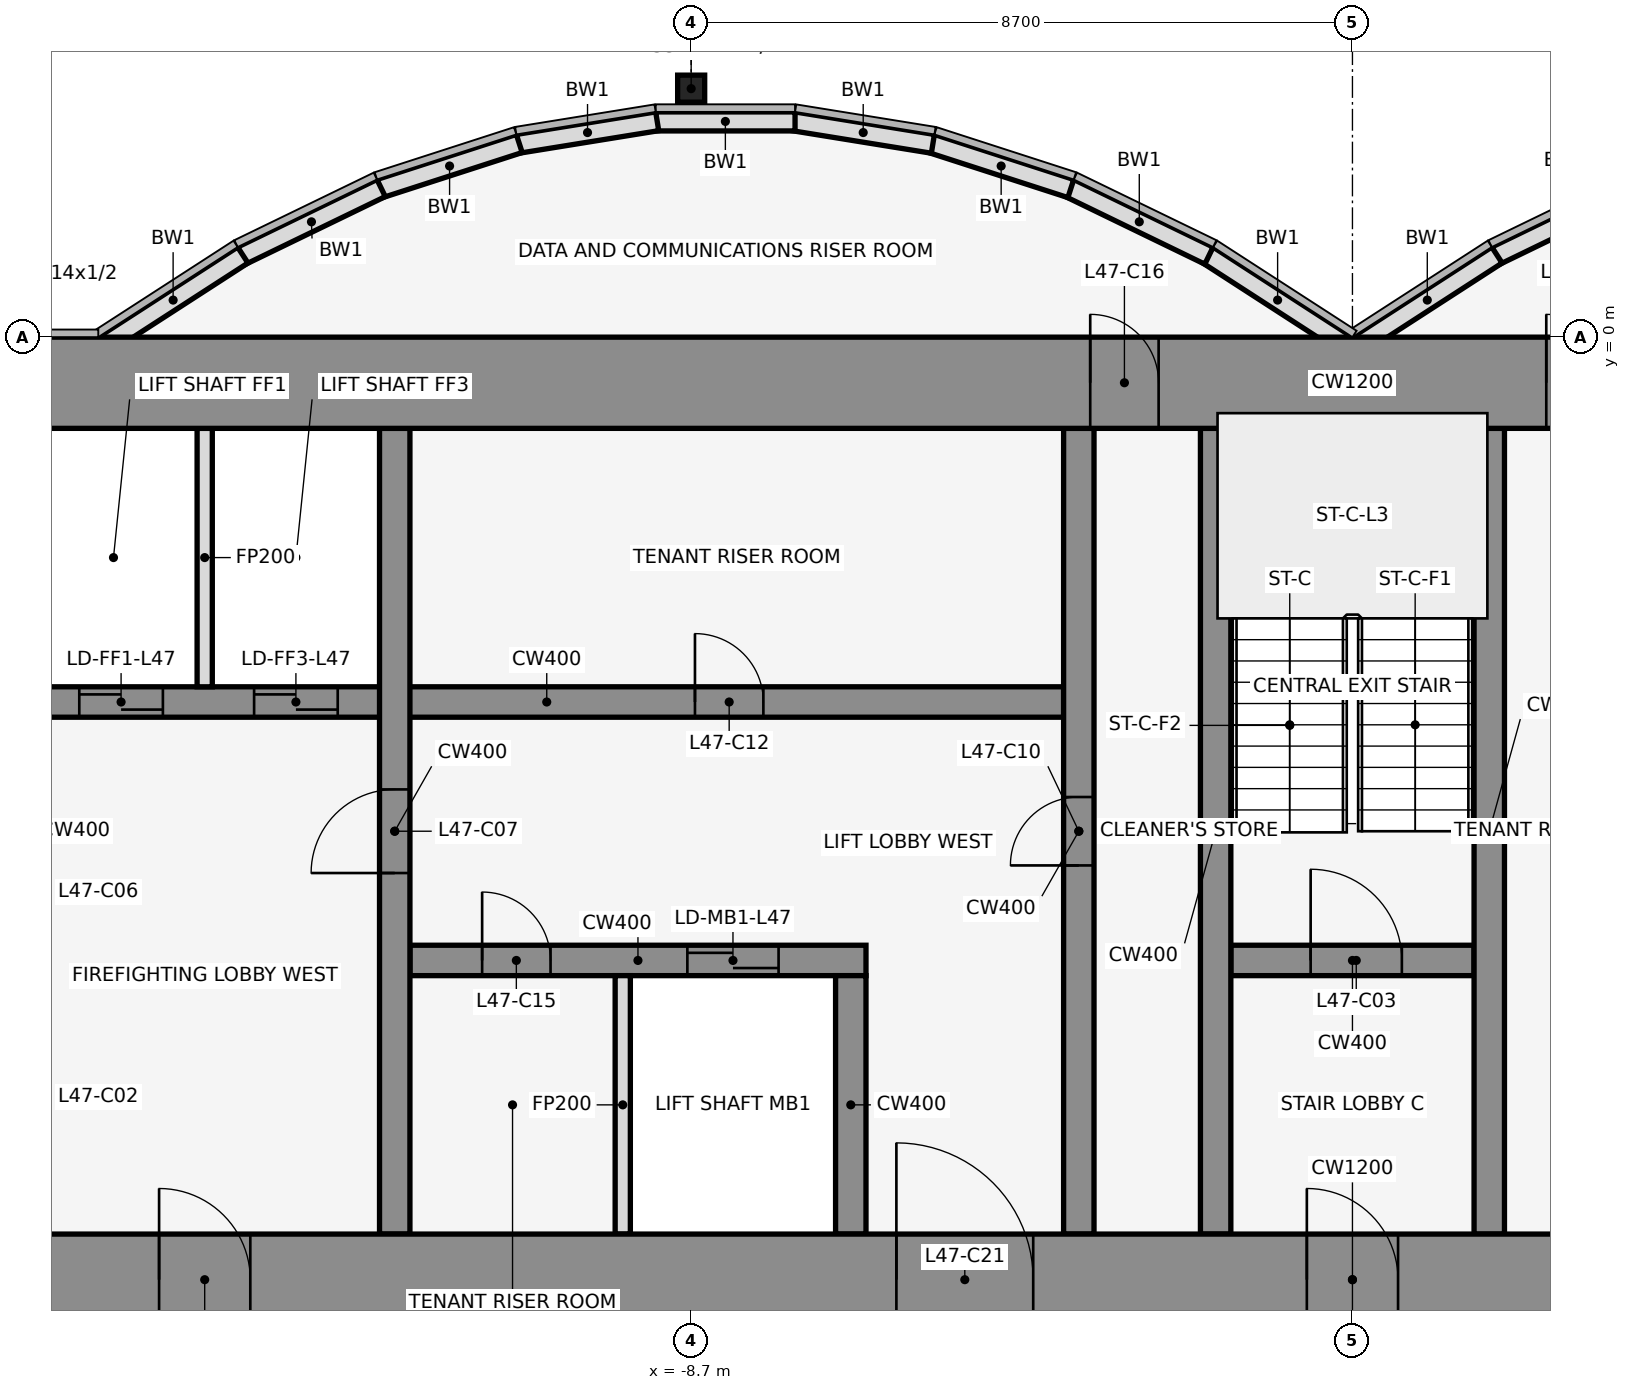
"""IFC4 building model, lengths in metres.
Left out: names, types, materials, properties, quantities, classifications, styles, units other than length and angle.
Written with IfcOpenShell. Run it as: python <this file> out.ifc"""

import sys

from ifc_helpers import new_model, si_unit, direction, frame, frame_2d, origin, origin_2d, place, context, subcontext, project, spatial, rectangle, hollow_rectangle, extrude, element, fill, save


model = new_model("IFC4")
c1 = context("Model", 3, precision=1e-05, world=origin(), true_north=direction((0.0, 1.0)))
c2 = subcontext(c1, "Body", "Model", "MODEL_VIEW")
j1 = project(units=[si_unit("LENGTHUNIT", "METRE"), si_unit("PLANEANGLEUNIT", "RADIAN")], contexts=[c1])
p1 = place(None, origin())
s1 = spatial("IfcSite", under=j1, at=p1, CompositionType="ELEMENT")
p2 = place(p1, origin())
s2 = spatial("IfcBuilding", under=s1, at=p2, CompositionType="ELEMENT")
p3 = place(p2, frame((0.0, 0.0, 211.4)))
s3 = spatial("IfcBuildingStorey", under=s2, at=p3, CompositionType="ELEMENT", Elevation=211.4)
p4 = place(p3, frame((-8.7, 3.269, 0.0), z_axis=(0.0, 0.0, 1.0), x_axis=(1.0, 0.0, 0.0)))
e1 = element("IfcColumn", 1, at=p4, inside=s3, PredefinedType="COLUMN", context=c2, shape_type="SweptSolid", body=[
    extrude(hollow_rectangle(XDim=0.356, YDim=0.356, WallThickness=0.012, at=origin_2d()), origin(), (0.0, 0.0, 1.0), 4.1),
])
p5 = place(p3, frame((3.721, 1.962, 0.0), z_axis=(0.0, 0.0, 1.0), x_axis=(-0.89982408427, -0.436252928206, 0.0)))
e2 = element("IfcWall", 2, at=p5, inside=s3, PredefinedType="STANDARD", context=c2, shape_type="SweptSolid", body=[
    extrude(rectangle(XDim=2.038, YDim=0.25, at=frame_2d((1.019, 0.0))), origin(), (0.0, 0.0, 1.0), 3.95),
])
for number, where, z_axis, x_axis in (
    (3, (1.901, 1.08, 0.0), (0.0, 0.0, 1.0), (-0.84, -0.543, 0.0)),
    (4, (-0.068, -0.105, 0.0), (0.0, 0.0, 1.0), (-0.84, 0.543, 0.0)),
):
    element("IfcWall", number, at=place(p3, frame(where, z_axis=z_axis, x_axis=x_axis)), inside=s3, PredefinedType="STANDARD", context=c2, shape_type="SweptSolid", body=[
        extrude(rectangle(XDim=2.183, YDim=0.25, at=frame_2d((1.091, 0.0))), origin(), (0.0, 0.0, 1.0), 3.95),
    ])
p6 = place(p3, frame((-1.888, 1.073, 0.0), z_axis=(0.0, 0.0, 1.0), x_axis=(-0.89982408427, 0.436252928206, 0.0)))
e5 = element("IfcWall", 5, at=p6, inside=s3, PredefinedType="STANDARD", context=c2, shape_type="SweptSolid", body=[
    extrude(rectangle(XDim=2.038, YDim=0.25, at=frame_2d((1.019, 0.0))), origin(), (0.0, 0.0, 1.0), 3.95),
])
p7 = place(p3, frame((-3.705, 1.955, 0.0), z_axis=(0.0, 0.0, 1.0), x_axis=(-0.951495806175, 0.307661714928, 0.0)))
e6 = element("IfcWall", 6, at=p7, inside=s3, PredefinedType="STANDARD", context=c2, shape_type="SweptSolid", body=[
    extrude(rectangle(XDim=1.927, YDim=0.25, at=frame_2d((0.963, 0.0))), origin(), (0.0, 0.0, 1.0), 3.95),
])
p8 = place(p3, frame((-5.52, 2.543, 0.0), z_axis=(0.0, 0.0, 1.0), x_axis=(-0.987181718931, 0.159600293885, 0.0)))
e7 = element("IfcWall", 7, at=p8, inside=s3, PredefinedType="STANDARD", context=c2, shape_type="SweptSolid", body=[
    extrude(rectangle(XDim=1.857, YDim=0.25, at=frame_2d((0.929, 0.0))), origin(), (0.0, 0.0, 1.0), 3.95),
])
p9 = place(p3, frame((-7.333, 2.838, 0.0), z_axis=(0.0, 0.0, 1.0), x_axis=(-1.0, 0.0, 0.0)))
e8 = element("IfcWall", 8, at=p9, inside=s3, PredefinedType="STANDARD", context=c2, shape_type="SweptSolid", body=[
    extrude(rectangle(XDim=1.833, YDim=0.25, at=frame_2d((0.917, 0.0))), origin(), (0.0, 0.0, 1.0), 3.95),
])
p10 = place(p3, frame((-9.147, 2.84, 0.0), z_axis=(0.0, 0.0, 1.0), x_axis=(-0.987181718931, -0.159600293885, 0.0)))
e9 = element("IfcWall", 9, at=p10, inside=s3, PredefinedType="STANDARD", context=c2, shape_type="SweptSolid", body=[
    extrude(rectangle(XDim=1.857, YDim=0.25, at=frame_2d((0.929, 0.0))), origin(), (0.0, 0.0, 1.0), 3.95),
])
p11 = place(p3, frame((-10.962, 2.548, 0.0), z_axis=(0.0, 0.0, 1.0), x_axis=(-0.951495806175, -0.307661714928, 0.0)))
e10 = element("IfcWall", 10, at=p11, inside=s3, PredefinedType="STANDARD", context=c2, shape_type="SweptSolid", body=[
    extrude(rectangle(XDim=1.927, YDim=0.25, at=frame_2d((0.963, 0.0))), origin(), (0.0, 0.0, 1.0), 3.95),
])
p12 = place(p3, frame((-12.779, 1.962, 0.0), z_axis=(0.0, 0.0, 1.0), x_axis=(-0.89982408427, -0.436252928206, 0.0)))
e11 = element("IfcWall", 11, at=p12, inside=s3, PredefinedType="STANDARD", context=c2, shape_type="SweptSolid", body=[
    extrude(rectangle(XDim=2.038, YDim=0.25, at=frame_2d((1.019, 0.0))), origin(), (0.0, 0.0, 1.0), 3.95),
])
p13 = place(p3, frame((-14.599, 1.08, 0.0), z_axis=(0.0, 0.0, 1.0), x_axis=(-0.83981312244, -0.542875602121, 0.0)))
e12 = element("IfcWall", 12, at=p13, inside=s3, PredefinedType="STANDARD", context=c2, shape_type="SweptSolid", body=[
    extrude(rectangle(XDim=2.183, YDim=0.25, at=frame_2d((1.091, 0.0))), origin(), (0.0, 0.0, 1.0), 3.95),
])
p14 = place(p3, frame((-12.4, -8.2, 0.0), z_axis=(0.0, 0.0, 1.0), x_axis=(1.0, 0.0, 0.0)))
e13 = element("IfcWall", 13, at=p14, inside=s3, PredefinedType="SHEAR", context=c2, shape_type="SweptSolid", body=[
    extrude(rectangle(XDim=6.0, YDim=0.4, at=frame_2d((3.0, 0.0))), origin(), (0.0, 0.0, 1.0), 4.1),
])
p15 = place(p14, frame((3.65, 0.0, 0.0)))
e14 = element("IfcOpeningElement", 14, at=p15, cuts=e13, PredefinedType="OPENING", context=c2, shape_type="SweptSolid", body=[
    extrude(rectangle(XDim=1.2, YDim=2.1, at=frame_2d((0.6, 1.05))), frame((0.0, 0.212, 0.0), z_axis=(0.0, -1.0, 0.0), x_axis=(1.0, 0.0, 0.0)), (0.0, 0.0, 1.0), 0.424),
])
p16 = place(p14, frame((0.95, 0.0, 0.0)))
e15 = element("IfcOpeningElement", 15, at=p16, cuts=e13, PredefinedType="OPENING", context=c2, shape_type="SweptSolid", body=[
    extrude(rectangle(XDim=0.9, YDim=2.1, at=frame_2d((0.45, 1.05))), frame((0.0, 0.212, 0.0), z_axis=(0.0, -1.0, 0.0), x_axis=(1.0, 0.0, 0.0)), (0.0, 0.0, 1.0), 0.424),
])
p17 = place(p3, frame((-1.6, -8.2, 0.0), z_axis=(0.0, 0.0, 1.0), x_axis=(1.0, 0.0, 0.0)))
e16 = element("IfcWall", 16, at=p17, inside=s3, PredefinedType="SHEAR", context=c2, shape_type="SweptSolid", body=[
    extrude(rectangle(XDim=3.2, YDim=0.4, at=frame_2d((1.6, 0.0))), origin(), (0.0, 0.0, 1.0), 4.1),
])
p18 = place(p17, frame((1.05, 0.0, 0.0)))
e17 = element("IfcOpeningElement", 17, at=p18, cuts=e16, PredefinedType="OPENING", context=c2, shape_type="SweptSolid", body=[
    extrude(rectangle(XDim=1.2, YDim=2.1, at=frame_2d((0.6, 1.05))), frame((0.0, 0.212, 0.0), z_axis=(0.0, -1.0, 0.0), x_axis=(1.0, 0.0, 0.0)), (0.0, 0.0, 1.0), 0.424),
])
p19 = place(p3, frame((-17.4, -4.8, 0.0), z_axis=(0.0, 0.0, 1.0), x_axis=(1.0, 0.0, 0.0)))
e18 = element("IfcWall", 18, at=p19, inside=s3, PredefinedType="SHEAR", context=c2, shape_type="SweptSolid", body=[
    extrude(rectangle(XDim=13.6, YDim=0.4, at=frame_2d((6.8, 0.0))), origin(), (0.0, 0.0, 1.0), 4.1),
])
p20 = place(p19, frame((0.65, 0.0, 0.0)))
e19 = element("IfcOpeningElement", 19, at=p20, cuts=e18, PredefinedType="OPENING", context=c2, shape_type="SweptSolid", body=[
    extrude(rectangle(XDim=1.1, YDim=2.1, at=frame_2d((0.55, 1.05))), frame((0.0, 0.212, 0.0), z_axis=(0.0, -1.0, 0.0), x_axis=(1.0, 0.0, 0.0)), (0.0, 0.0, 1.0), 0.424),
])
p21 = place(p19, frame((2.95, 0.0, 0.0)))
e20 = element("IfcOpeningElement", 20, at=p21, cuts=e18, PredefinedType="OPENING", context=c2, shape_type="SweptSolid", body=[
    extrude(rectangle(XDim=1.1, YDim=2.1, at=frame_2d((0.55, 1.05))), frame((0.0, 0.212, 0.0), z_axis=(0.0, -1.0, 0.0), x_axis=(1.0, 0.0, 0.0)), (0.0, 0.0, 1.0), 0.424),
])
p22 = place(p19, frame((8.75, 0.0, 0.0)))
e21 = element("IfcOpeningElement", 21, at=p22, cuts=e18, PredefinedType="OPENING", context=c2, shape_type="SweptSolid", body=[
    extrude(rectangle(XDim=0.9, YDim=2.1, at=frame_2d((0.45, 1.05))), frame((0.0, 0.212, 0.0), z_axis=(0.0, -1.0, 0.0), x_axis=(1.0, 0.0, 0.0)), (0.0, 0.0, 1.0), 0.424),
])
p23 = place(p3, frame((-15.1, -4.6, 0.0), z_axis=(0.0, 0.0, 1.0), x_axis=(0.0, 1.0, 0.0)))
e22 = element("IfcWall", 22, at=p23, inside=s3, PredefinedType="PARTITIONING", context=c2, shape_type="SweptSolid", body=[
    extrude(rectangle(XDim=3.4, YDim=0.2, at=frame_2d((1.7, 0.0))), origin(), (0.0, 0.0, 1.0), 2.841),
])
p24 = place(p3, frame((-12.6, -11.8, 0.0), z_axis=(0.0, 0.0, 1.0), x_axis=(0.0, 1.0, 0.0)))
e23 = element("IfcWall", 23, at=p24, inside=s3, PredefinedType="SHEAR", context=c2, shape_type="SweptSolid", body=[
    extrude(rectangle(XDim=10.6, YDim=0.4, at=frame_2d((5.3, 0.0))), origin(), (0.0, 0.0, 1.0), 4.1),
])
p25 = place(p24, frame((4.75, 0.0, 0.0)))
e24 = element("IfcOpeningElement", 24, at=p25, cuts=e23, PredefinedType="OPENING", context=c2, shape_type="SweptSolid", body=[
    extrude(rectangle(XDim=1.1, YDim=2.1, at=frame_2d((0.55, 1.05))), frame((0.0, 0.212, 0.0), z_axis=(0.0, -1.0, 0.0), x_axis=(1.0, 0.0, 0.0)), (0.0, 0.0, 1.0), 0.424),
])
p26 = place(p3, frame((-9.6, -11.8, 0.0), z_axis=(0.0, 0.0, 1.0), x_axis=(0.0, 1.0, 0.0)))
e25 = element("IfcWall", 25, at=p26, inside=s3, PredefinedType="PARTITIONING", context=c2, shape_type="SweptSolid", body=[
    extrude(rectangle(XDim=3.4, YDim=0.2, at=frame_2d((1.7, 0.0))), origin(), (0.0, 0.0, 1.0), 2.841),
])
p27 = place(p3, frame((-6.6, -11.8, 0.0), z_axis=(0.0, 0.0, 1.0), x_axis=(0.0, 1.0, 0.0)))
e26 = element("IfcWall", 26, at=p27, inside=s3, PredefinedType="SHEAR", context=c2, shape_type="SweptSolid", body=[
    extrude(rectangle(XDim=3.4, YDim=0.4, at=frame_2d((1.7, 0.0))), origin(), (0.0, 0.0, 1.0), 4.1),
])
p28 = place(p3, frame((-3.6, -11.8, 0.0), z_axis=(0.0, 0.0, 1.0), x_axis=(0.0, 1.0, 0.0)))
e27 = element("IfcWall", 27, at=p28, inside=s3, PredefinedType="SHEAR", context=c2, shape_type="SweptSolid", body=[
    extrude(rectangle(XDim=10.6, YDim=0.4, at=frame_2d((5.3, 0.0))), origin(), (0.0, 0.0, 1.0), 4.1),
])
p29 = place(p28, frame((4.85, 0.0, 0.0)))
e28 = element("IfcOpeningElement", 28, at=p29, cuts=e27, PredefinedType="OPENING", context=c2, shape_type="SweptSolid", body=[
    extrude(rectangle(XDim=0.9, YDim=2.1, at=frame_2d((0.45, 1.05))), frame((0.0, 0.212, 0.0), z_axis=(0.0, -1.0, 0.0), x_axis=(1.0, 0.0, 0.0)), (0.0, 0.0, 1.0), 0.424),
])
for number, where, z_axis, x_axis in (
    (29, (-1.8, -11.8, 0.0), (0.0, 0.0, 1.0), (0.0, 1.0, 0.0)),
    (30, (1.8, -11.8, 0.0), (0.0, 0.0, 1.0), (0.0, 1.0, 0.0)),
):
    element("IfcWall", number, at=place(p3, frame(where, z_axis=z_axis, x_axis=x_axis)), inside=s3, PredefinedType="SHEAR", context=c2, shape_type="SweptSolid", body=[
        extrude(rectangle(XDim=10.6, YDim=0.4, at=frame_2d((5.3, 0.0))), origin(), (0.0, 0.0, 1.0), 4.1),
    ])
p30 = place(p3, frame((-22.0, -0.6, 0.0), z_axis=(0.0, 0.0, 1.0), x_axis=(1.0, 0.0, 0.0)))
e31 = element("IfcWall", 31, at=p30, inside=s3, PredefinedType="SHEAR", context=c2, shape_type="SweptSolid", body=[
    extrude(rectangle(XDim=44.0, YDim=1.2, at=frame_2d((22.0, 0.0))), origin(), (0.0, 0.0, 1.0), 4.1),
])
p31 = place(p30, frame((18.55, 0.0, 0.0)))
e32 = element("IfcOpeningElement", 32, at=p31, cuts=e31, PredefinedType="OPENING", context=c2, shape_type="SweptSolid", body=[
    extrude(rectangle(XDim=0.9, YDim=2.1, at=frame_2d((0.45, 1.05))), frame((0.0, 0.612, 0.0), z_axis=(0.0, -1.0, 0.0), x_axis=(1.0, 0.0, 0.0)), (0.0, 0.0, 1.0), 1.224),
])
p32 = place(p30, frame((24.55, 0.0, 0.0)))
e33 = element("IfcOpeningElement", 33, at=p32, cuts=e31, PredefinedType="OPENING", context=c2, shape_type="SweptSolid", body=[
    extrude(rectangle(XDim=0.9, YDim=2.1, at=frame_2d((0.45, 1.05))), frame((0.0, 0.612, 0.0), z_axis=(0.0, -1.0, 0.0), x_axis=(1.0, 0.0, 0.0)), (0.0, 0.0, 1.0), 1.224),
])
p33 = place(p3, frame((-22.0, -12.4, 0.0), z_axis=(0.0, 0.0, 1.0), x_axis=(1.0, 0.0, 0.0)))
e34 = element("IfcWall", 34, at=p33, inside=s3, PredefinedType="SHEAR", context=c2, shape_type="SweptSolid", body=[
    extrude(rectangle(XDim=44.0, YDim=1.2, at=frame_2d((22.0, 0.0))), origin(), (0.0, 0.0, 1.0), 4.1),
])
p34 = place(p33, frame((2.2, 0.0, 0.0)))
e35 = element("IfcOpeningElement", 35, at=p34, cuts=e34, PredefinedType="OPENING", context=c2, shape_type="SweptSolid", body=[
    extrude(rectangle(XDim=1.2, YDim=2.1, at=frame_2d((0.6, 1.05))), frame((0.0, 0.612, 0.0), z_axis=(0.0, -1.0, 0.0), x_axis=(1.0, 0.0, 0.0)), (0.0, 0.0, 1.0), 1.224),
])
p35 = place(p33, frame((21.4, 0.0, 0.0)))
e36 = element("IfcOpeningElement", 36, at=p35, cuts=e34, PredefinedType="OPENING", context=c2, shape_type="SweptSolid", body=[
    extrude(rectangle(XDim=1.2, YDim=2.1, at=frame_2d((0.6, 1.05))), frame((0.0, 0.612, 0.0), z_axis=(0.0, -1.0, 0.0), x_axis=(1.0, 0.0, 0.0)), (0.0, 0.0, 1.0), 1.224),
])
p36 = place(p33, frame((40.6, 0.0, 0.0)))
e37 = element("IfcOpeningElement", 37, at=p36, cuts=e34, PredefinedType="OPENING", context=c2, shape_type="SweptSolid", body=[
    extrude(rectangle(XDim=1.2, YDim=2.1, at=frame_2d((0.6, 1.05))), frame((0.0, 0.612, 0.0), z_axis=(0.0, -1.0, 0.0), x_axis=(1.0, 0.0, 0.0)), (0.0, 0.0, 1.0), 1.224),
])
p37 = place(p33, frame((16.0, 0.0, 0.0)))
e38 = element("IfcOpeningElement", 38, at=p37, cuts=e34, PredefinedType="OPENING", context=c2, shape_type="SweptSolid", body=[
    extrude(rectangle(XDim=1.8, YDim=2.1, at=frame_2d((0.9, 1.05))), frame((0.0, 0.612, 0.0), z_axis=(0.0, -1.0, 0.0), x_axis=(1.0, 0.0, 0.0)), (0.0, 0.0, 1.0), 1.224),
])
p38 = place(p33, frame((6.3, 0.0, 0.0)))
e39 = element("IfcOpeningElement", 39, at=p38, cuts=e34, PredefinedType="OPENING", context=c2, shape_type="SweptSolid", body=[
    extrude(rectangle(XDim=1.2, YDim=2.1, at=frame_2d((0.6, 1.05))), frame((0.0, 0.612, 0.0), z_axis=(0.0, -1.0, 0.0), x_axis=(1.0, 0.0, 0.0)), (0.0, 0.0, 1.0), 1.224),
])
p39 = place(p33, frame((26.2, 0.0, 0.0)))
e40 = element("IfcOpeningElement", 40, at=p39, cuts=e34, PredefinedType="OPENING", context=c2, shape_type="SweptSolid", body=[
    extrude(rectangle(XDim=1.8, YDim=2.1, at=frame_2d((0.9, 1.05))), frame((0.0, 0.612, 0.0), z_axis=(0.0, -1.0, 0.0), x_axis=(1.0, 0.0, 0.0)), (0.0, 0.0, 1.0), 1.224),
])
p40 = place(p33, frame((36.5, 0.0, 0.0)))
e41 = element("IfcOpeningElement", 41, at=p40, cuts=e34, PredefinedType="OPENING", context=c2, shape_type="SweptSolid", body=[
    extrude(rectangle(XDim=1.2, YDim=2.1, at=frame_2d((0.6, 1.05))), frame((0.0, 0.612, 0.0), z_axis=(0.0, -1.0, 0.0), x_axis=(1.0, 0.0, 0.0)), (0.0, 0.0, 1.0), 1.224),
])
p41 = place(p18, origin())
e42 = element("IfcDoor", 42, at=p41, inside=s3, OperationType="SINGLE_SWING_LEFT", PredefinedType="DOOR", context=c2, shape_type="SweptSolid", body=[
    extrude(rectangle(XDim=1.2, YDim=2.1, at=frame_2d((0.6, 1.05))), frame((0.0, 0.025, 0.0), z_axis=(0.0, -1.0, 0.0), x_axis=(1.0, 0.0, 0.0)), (0.0, 0.0, 1.0), 0.05),
])
fill(e17, e42)
p42 = place(p20, origin())
e43 = element("IfcDoor", 43, at=p42, inside=s3, OperationType="DOUBLE_DOOR_SLIDING", PredefinedType="DOOR", context=c2, shape_type="SweptSolid", body=[
    extrude(rectangle(XDim=1.1, YDim=2.1, at=frame_2d((0.55, 1.05))), frame((0.0, 0.025, 0.0), z_axis=(0.0, -1.0, 0.0), x_axis=(1.0, 0.0, 0.0)), (0.0, 0.0, 1.0), 0.05),
])
fill(e19, e43)
p43 = place(p21, origin())
e44 = element("IfcDoor", 44, at=p43, inside=s3, OperationType="DOUBLE_DOOR_SLIDING", PredefinedType="DOOR", context=c2, shape_type="SweptSolid", body=[
    extrude(rectangle(XDim=1.1, YDim=2.1, at=frame_2d((0.55, 1.05))), frame((0.0, 0.025, 0.0), z_axis=(0.0, -1.0, 0.0), x_axis=(1.0, 0.0, 0.0)), (0.0, 0.0, 1.0), 0.05),
])
fill(e20, e44)
p44 = place(p15, origin())
e45 = element("IfcDoor", 45, at=p44, inside=s3, OperationType="DOUBLE_DOOR_SLIDING", PredefinedType="DOOR", context=c2, shape_type="SweptSolid", body=[
    extrude(rectangle(XDim=1.2, YDim=2.1, at=frame_2d((0.6, 1.05))), frame((0.0, 0.025, 0.0), z_axis=(0.0, -1.0, 0.0), x_axis=(1.0, 0.0, 0.0)), (0.0, 0.0, 1.0), 0.05),
])
fill(e14, e45)
p45 = place(p25, origin())
e46 = element("IfcDoor", 46, at=p45, inside=s3, OperationType="SINGLE_SWING_LEFT", PredefinedType="DOOR", context=c2, shape_type="SweptSolid", body=[
    extrude(rectangle(XDim=1.1, YDim=2.1, at=frame_2d((0.55, 1.05))), frame((0.0, 0.025, 0.0), z_axis=(0.0, -1.0, 0.0), x_axis=(1.0, 0.0, 0.0)), (0.0, 0.0, 1.0), 0.05),
])
fill(e24, e46)
p46 = place(p29, frame((0.9, 0.0, 0.0), z_axis=(0.0, 0.0, 1.0), x_axis=(-1.0, 0.0, 0.0)))
e47 = element("IfcDoor", 47, at=p46, inside=s3, OperationType="SINGLE_SWING_LEFT", PredefinedType="DOOR", context=c2, shape_type="SweptSolid", body=[
    extrude(rectangle(XDim=0.9, YDim=2.1, at=frame_2d((0.45, 1.05))), frame((0.0, 0.025, 0.0), z_axis=(0.0, -1.0, 0.0), x_axis=(1.0, 0.0, 0.0)), (0.0, 0.0, 1.0), 0.05),
])
fill(e28, e47)
p47 = place(p22, origin())
e48 = element("IfcDoor", 48, at=p47, inside=s3, OperationType="SINGLE_SWING_RIGHT", PredefinedType="DOOR", context=c2, shape_type="SweptSolid", body=[
    extrude(rectangle(XDim=0.9, YDim=2.1, at=frame_2d((0.45, 1.05))), frame((0.0, 0.025, 0.0), z_axis=(0.0, -1.0, 0.0), x_axis=(1.0, 0.0, 0.0)), (0.0, 0.0, 1.0), 0.05),
])
fill(e21, e48)
p48 = place(p16, frame((0.9, 0.0, 0.0), z_axis=(0.0, 0.0, 1.0), x_axis=(-1.0, 0.0, 0.0)))
e49 = element("IfcDoor", 49, at=p48, inside=s3, OperationType="SINGLE_SWING_RIGHT", PredefinedType="DOOR", context=c2, shape_type="SweptSolid", body=[
    extrude(rectangle(XDim=0.9, YDim=2.1, at=frame_2d((0.45, 1.05))), frame((0.0, 0.025, 0.0), z_axis=(0.0, -1.0, 0.0), x_axis=(1.0, 0.0, 0.0)), (0.0, 0.0, 1.0), 0.05),
])
fill(e15, e49)
p49 = place(p31, origin())
e50 = element("IfcDoor", 50, at=p49, inside=s3, OperationType="SINGLE_SWING_LEFT", PredefinedType="DOOR", context=c2, shape_type="SweptSolid", body=[
    extrude(rectangle(XDim=0.9, YDim=2.1, at=frame_2d((0.45, 1.05))), frame((0.0, 0.025, 0.0), z_axis=(0.0, -1.0, 0.0), x_axis=(1.0, 0.0, 0.0)), (0.0, 0.0, 1.0), 0.05),
])
fill(e32, e50)
p50 = place(p32, origin())
e51 = element("IfcDoor", 51, at=p50, inside=s3, OperationType="SINGLE_SWING_LEFT", PredefinedType="DOOR", context=c2, shape_type="SweptSolid", body=[
    extrude(rectangle(XDim=0.9, YDim=2.1, at=frame_2d((0.45, 1.05))), frame((0.0, 0.025, 0.0), z_axis=(0.0, -1.0, 0.0), x_axis=(1.0, 0.0, 0.0)), (0.0, 0.0, 1.0), 0.05),
])
fill(e33, e51)
p51 = place(p35, frame((1.2, 0.0, 0.0), z_axis=(0.0, 0.0, 1.0), x_axis=(-1.0, 0.0, 0.0)))
e52 = element("IfcDoor", 52, at=p51, inside=s3, OperationType="SINGLE_SWING_RIGHT", PredefinedType="DOOR", context=c2, shape_type="SweptSolid", body=[
    extrude(rectangle(XDim=1.2, YDim=2.1, at=frame_2d((0.6, 1.05))), frame((0.0, 0.025, 0.0), z_axis=(0.0, -1.0, 0.0), x_axis=(1.0, 0.0, 0.0)), (0.0, 0.0, 1.0), 0.05),
])
fill(e36, e52)
p52 = place(p37, origin())
e53 = element("IfcDoor", 53, at=p52, inside=s3, OperationType="SINGLE_SWING_LEFT", PredefinedType="DOOR", context=c2, shape_type="SweptSolid", body=[
    extrude(rectangle(XDim=1.8, YDim=2.1, at=frame_2d((0.9, 1.05))), frame((0.0, 0.025, 0.0), z_axis=(0.0, -1.0, 0.0), x_axis=(1.0, 0.0, 0.0)), (0.0, 0.0, 1.0), 0.05),
])
fill(e38, e53)
p53 = place(p38, frame((1.2, 0.0, 0.0), z_axis=(0.0, 0.0, 1.0), x_axis=(-1.0, 0.0, 0.0)))
e54 = element("IfcDoor", 54, at=p53, inside=s3, OperationType="SINGLE_SWING_RIGHT", PredefinedType="DOOR", context=c2, shape_type="SweptSolid", body=[
    extrude(rectangle(XDim=1.2, YDim=2.1, at=frame_2d((0.6, 1.05))), frame((0.0, 0.025, 0.0), z_axis=(0.0, -1.0, 0.0), x_axis=(1.0, 0.0, 0.0)), (0.0, 0.0, 1.0), 0.05),
])
fill(e39, e54)
save(model, sys.argv[1])
